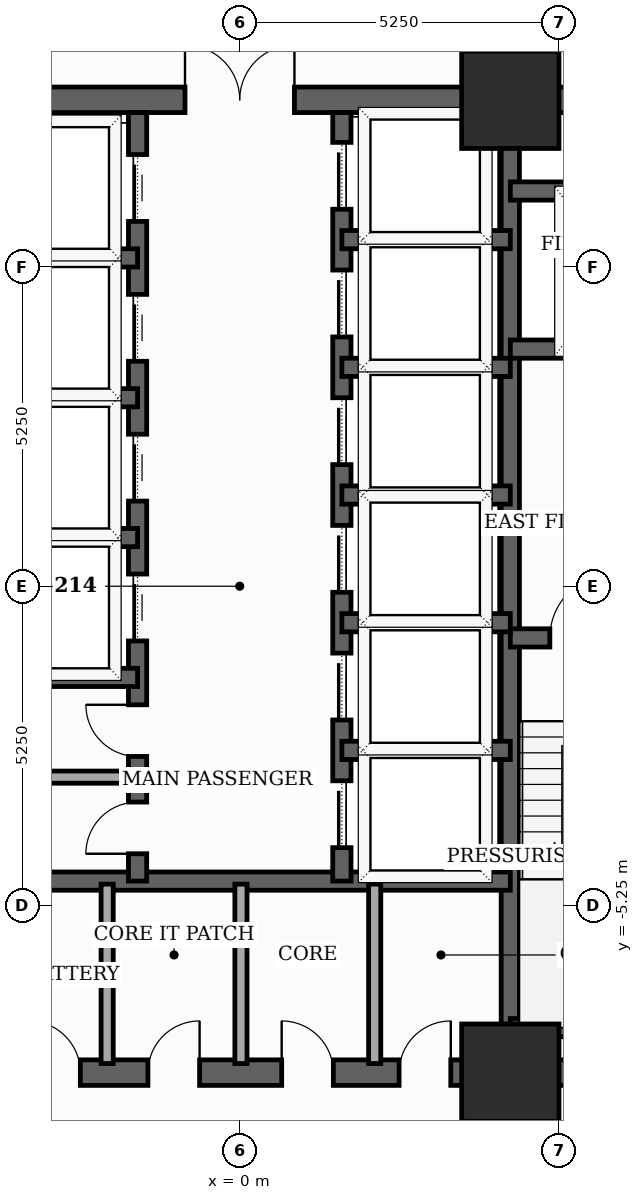
"""IFC4 building model, lengths in metres.
Left out: names, types, materials, properties, quantities, classifications, styles, units other than length and angle.
Written with IfcOpenShell. Run it as: python <this file> out.ifc"""

import sys

from ifc_helpers import new_model, si_unit, direction, frame, frame_2d, origin, origin_2d, place, context, subcontext, project, spatial, rectangle, extrude, element, fill, save


model = new_model("IFC4")
c1 = context("Model", 3, precision=1e-05, world=origin(), true_north=direction((0.0, 1.0)))
c2 = subcontext(c1, "Body", "Model", "MODEL_VIEW")
j1 = project(units=[si_unit("LENGTHUNIT", "METRE"), si_unit("PLANEANGLEUNIT", "RADIAN")], contexts=[c1])
p1 = place(None, origin())
s1 = spatial("IfcSite", under=j1, at=p1, CompositionType="ELEMENT")
p2 = place(p1, origin())
s2 = spatial("IfcBuilding", under=s1, at=p2, CompositionType="ELEMENT")
p3 = place(p2, frame((0.0, 0.0, 81.5)))
s3 = spatial("IfcBuildingStorey", under=s2, at=p3, CompositionType="ELEMENT", Elevation=81.5)
for number, where, z_axis, x_axis in (
    (1, (4.45, -8.0, 0.0), (0.0, 0.0, 1.0), (1.0, 0.0, 0.0)),
    (2, (4.45, 8.0, 0.0), (0.0, 0.0, 1.0), (1.0, 0.0, 0.0)),
):
    element("IfcColumn", number, at=place(p3, frame(where, z_axis=z_axis, x_axis=x_axis)), inside=s3, PredefinedType="COLUMN", context=c2, shape_type="SweptSolid", body=[
        extrude(rectangle(XDim=1.6, YDim=1.6, at=origin_2d()), origin(), (0.0, 0.0, 1.0), 3.7),
    ])
p4 = place(p3, frame((-8.0, -8.0, 0.0), z_axis=(0.0, 0.0, 1.0), x_axis=(1.0, 0.0, 0.0)))
e3 = element("IfcWall", 3, at=p4, inside=s3, PredefinedType="SHEAR", context=c2, shape_type="SweptSolid", body=[
    extrude(rectangle(XDim=16.0, YDim=0.42, at=frame_2d((8.0, 0.0))), origin(), (0.0, 0.0, 1.0), 3.46),
])
p5 = place(p4, frame((4.529, 0.0, 0.0)))
e4 = element("IfcOpeningElement", 4, at=p5, cuts=e3, PredefinedType="OPENING", context=c2, shape_type="SweptSolid", body=[
    extrude(rectangle(XDim=0.85, YDim=2.02, at=frame_2d((0.425, 1.01))), frame((0.0, 0.22, 0.0), z_axis=(0.0, -1.0, 0.0), x_axis=(1.0, 0.0, 0.0)), (0.0, 0.0, 1.0), 0.44),
])
p6 = place(p4, frame((6.49, 0.0, 0.0)))
e5 = element("IfcOpeningElement", 5, at=p6, cuts=e3, PredefinedType="OPENING", context=c2, shape_type="SweptSolid", body=[
    extrude(rectangle(XDim=0.85, YDim=2.02, at=frame_2d((0.425, 1.01))), frame((0.0, 0.22, 0.0), z_axis=(0.0, -1.0, 0.0), x_axis=(1.0, 0.0, 0.0)), (0.0, 0.0, 1.0), 0.44),
])
p7 = place(p4, frame((8.69, 0.0, 0.0)))
e6 = element("IfcOpeningElement", 6, at=p7, cuts=e3, PredefinedType="OPENING", context=c2, shape_type="SweptSolid", body=[
    extrude(rectangle(XDim=0.85, YDim=2.02, at=frame_2d((0.425, 1.01))), frame((0.0, 0.22, 0.0), z_axis=(0.0, -1.0, 0.0), x_axis=(1.0, 0.0, 0.0)), (0.0, 0.0, 1.0), 0.44),
])
p8 = place(p4, frame((10.621, 0.0, 0.0)))
e7 = element("IfcOpeningElement", 7, at=p8, cuts=e3, PredefinedType="OPENING", context=c2, shape_type="SweptSolid", body=[
    extrude(rectangle(XDim=0.85, YDim=2.02, at=frame_2d((0.425, 1.01))), frame((0.0, 0.22, 0.0), z_axis=(0.0, -1.0, 0.0), x_axis=(1.0, 0.0, 0.0)), (0.0, 0.0, 1.0), 0.44),
])
p9 = place(p3, frame((-8.0, 8.0, 0.0), z_axis=(0.0, 0.0, 1.0), x_axis=(1.0, 0.0, 0.0)))
e8 = element("IfcWall", 8, at=p9, inside=s3, PredefinedType="SHEAR", context=c2, shape_type="SweptSolid", body=[
    extrude(rectangle(XDim=16.0, YDim=0.42, at=frame_2d((8.0, 0.0))), origin(), (0.0, 0.0, 1.0), 3.46),
])
p10 = place(p9, frame((7.1, 0.0, 0.0)))
e9 = element("IfcOpeningElement", 9, at=p10, cuts=e8, PredefinedType="OPENING", context=c2, shape_type="SweptSolid", body=[
    extrude(rectangle(XDim=1.8, YDim=2.15, at=frame_2d((0.9, 1.075))), frame((0.0, 0.22, 0.0), z_axis=(0.0, -1.0, 0.0), x_axis=(1.0, 0.0, 0.0)), (0.0, 0.0, 1.0), 0.44),
])
p11 = place(p3, frame((4.45, -7.79, 0.0), z_axis=(0.0, 0.0, 1.0), x_axis=(0.0, 1.0, 0.0)))
e10 = element("IfcWall", 10, at=p11, inside=s3, PredefinedType="SHEAR", context=c2, shape_type="SweptSolid", body=[
    extrude(rectangle(XDim=15.58, YDim=0.3, at=frame_2d((7.79, 0.0))), origin(), (0.0, 0.0, 1.0), 3.46),
])
p12 = place(p3, frame((4.45, -0.85, 0.0), z_axis=(0.0, 0.0, 1.0), x_axis=(1.0, 0.0, 0.0)))
e11 = element("IfcWall", 11, at=p12, inside=s3, PredefinedType="SHEAR", context=c2, shape_type="SweptSolid", body=[
    extrude(rectangle(XDim=3.34, YDim=0.3, at=frame_2d((1.67, 0.0))), origin(), (0.0, 0.0, 1.0), 3.46),
])
p13 = place(p12, frame((0.65, 0.0, 0.0)))
e12 = element("IfcOpeningElement", 12, at=p13, cuts=e11, PredefinedType="OPENING", context=c2, shape_type="SweptSolid", body=[
    extrude(rectangle(XDim=1.05, YDim=2.15, at=frame_2d((0.525, 1.075))), frame((0.0, 0.16, 0.0), z_axis=(0.0, -1.0, 0.0), x_axis=(1.0, 0.0, 0.0)), (0.0, 0.0, 1.0), 0.32),
])
p14 = place(p3, frame((4.45, -7.26, 0.0), z_axis=(0.0, 0.0, 1.0), x_axis=(1.0, 0.0, 0.0)))
e13 = element("IfcWall", 13, at=p14, inside=s3, PredefinedType="SHEAR", context=c2, shape_type="SweptSolid", body=[
    extrude(rectangle(XDim=3.55, YDim=0.3, at=frame_2d((1.775, 0.0))), origin(), (0.0, 0.0, 1.0), 3.46),
])
p15 = place(p3, frame((4.45, 3.9, 0.0), z_axis=(0.0, 0.0, 1.0), x_axis=(1.0, 0.0, 0.0)))
e14 = element("IfcWall", 14, at=p15, inside=s3, PredefinedType="SHEAR", context=c2, shape_type="SweptSolid", body=[
    extrude(rectangle(XDim=3.34, YDim=0.3, at=frame_2d((1.67, 0.0))), origin(), (0.0, 0.0, 1.0), 3.46),
])
p16 = place(p15, frame((1.18, 0.0, 0.0)))
e15 = element("IfcOpeningElement", 15, at=p16, cuts=e14, PredefinedType="OPENING", context=c2, shape_type="SweptSolid", body=[
    extrude(rectangle(XDim=1.1, YDim=2.1, at=frame_2d((0.55, 1.05))), frame((0.0, 0.16, 0.0), z_axis=(0.0, -1.0, 0.0), x_axis=(1.0, 0.0, 0.0)), (0.0, 0.0, 1.0), 0.32),
])
p17 = place(p3, frame((4.45, 6.5, 0.0), z_axis=(0.0, 0.0, 1.0), x_axis=(1.0, 0.0, 0.0)))
e16 = element("IfcWall", 16, at=p17, inside=s3, PredefinedType="SHEAR", context=c2, shape_type="SweptSolid", body=[
    extrude(rectangle(XDim=3.34, YDim=0.3, at=frame_2d((1.67, 0.0))), origin(), (0.0, 0.0, 1.0), 3.46),
])
p18 = place(p3, frame((-4.45, -4.85, 0.0), z_axis=(0.0, 0.0, 1.0), x_axis=(1.0, 0.0, 0.0)))
e17 = element("IfcWall", 17, at=p18, inside=s3, PredefinedType="SHEAR", context=c2, shape_type="SweptSolid", body=[
    extrude(rectangle(XDim=8.9, YDim=0.3, at=frame_2d((4.45, 0.0))), origin(), (0.0, 0.0, 1.0), 3.46),
])
p19 = place(p3, frame((-1.68, -4.85, 0.0), z_axis=(0.0, 0.0, 1.0), x_axis=(0.0, 1.0, 0.0)))
e18 = element("IfcWall", 18, at=p19, inside=s3, PredefinedType="SHEAR", context=c2, shape_type="SweptSolid", body=[
    extrude(rectangle(XDim=12.64, YDim=0.3, at=frame_2d((6.32, 0.0))), origin(), (0.0, 0.0, 1.0), 3.46),
])
p20 = place(p19, frame((3.95, 0.0, 0.0)))
e19 = element("IfcOpeningElement", 19, at=p20, cuts=e18, PredefinedType="OPENING", context=c2, shape_type="SweptSolid", body=[
    extrude(rectangle(XDim=1.1, YDim=2.1, at=frame_2d((0.55, 1.05))), frame((0.0, 0.16, 0.0), z_axis=(0.0, -1.0, 0.0), x_axis=(1.0, 0.0, 0.0)), (0.0, 0.0, 1.0), 0.32),
])
p21 = place(p19, frame((6.25, 0.0, 0.0)))
e20 = element("IfcOpeningElement", 20, at=p21, cuts=e18, PredefinedType="OPENING", context=c2, shape_type="SweptSolid", body=[
    extrude(rectangle(XDim=1.1, YDim=2.1, at=frame_2d((0.55, 1.05))), frame((0.0, 0.16, 0.0), z_axis=(0.0, -1.0, 0.0), x_axis=(1.0, 0.0, 0.0)), (0.0, 0.0, 1.0), 0.32),
])
p22 = place(p19, frame((8.55, 0.0, 0.0)))
e21 = element("IfcOpeningElement", 21, at=p22, cuts=e18, PredefinedType="OPENING", context=c2, shape_type="SweptSolid", body=[
    extrude(rectangle(XDim=1.1, YDim=2.1, at=frame_2d((0.55, 1.05))), frame((0.0, 0.16, 0.0), z_axis=(0.0, -1.0, 0.0), x_axis=(1.0, 0.0, 0.0)), (0.0, 0.0, 1.0), 0.32),
])
p23 = place(p19, frame((10.85, 0.0, 0.0)))
e22 = element("IfcOpeningElement", 22, at=p23, cuts=e18, PredefinedType="OPENING", context=c2, shape_type="SweptSolid", body=[
    extrude(rectangle(XDim=1.1, YDim=2.1, at=frame_2d((0.55, 1.05))), frame((0.0, 0.16, 0.0), z_axis=(0.0, -1.0, 0.0), x_axis=(1.0, 0.0, 0.0)), (0.0, 0.0, 1.0), 0.32),
])
p24 = place(p19, frame((0.45, 0.0, 0.0)))
e23 = element("IfcOpeningElement", 23, at=p24, cuts=e18, PredefinedType="OPENING", context=c2, shape_type="SweptSolid", body=[
    extrude(rectangle(XDim=0.85, YDim=2.02, at=frame_2d((0.425, 1.01))), frame((0.0, 0.16, 0.0), z_axis=(0.0, -1.0, 0.0), x_axis=(1.0, 0.0, 0.0)), (0.0, 0.0, 1.0), 0.32),
])
p25 = place(p19, frame((2.05, 0.0, 0.0)))
e24 = element("IfcOpeningElement", 24, at=p25, cuts=e18, PredefinedType="OPENING", context=c2, shape_type="SweptSolid", body=[
    extrude(rectangle(XDim=0.85, YDim=2.02, at=frame_2d((0.425, 1.01))), frame((0.0, 0.16, 0.0), z_axis=(0.0, -1.0, 0.0), x_axis=(1.0, 0.0, 0.0)), (0.0, 0.0, 1.0), 0.32),
])
p26 = place(p3, frame((1.68, -4.85, 0.0), z_axis=(0.0, 0.0, 1.0), x_axis=(0.0, 1.0, 0.0)))
e25 = element("IfcWall", 25, at=p26, inside=s3, PredefinedType="SHEAR", context=c2, shape_type="SweptSolid", body=[
    extrude(rectangle(XDim=12.64, YDim=0.3, at=frame_2d((6.32, 0.0))), origin(), (0.0, 0.0, 1.0), 3.46),
])
p27 = place(p26, frame((0.55, 0.0, 0.0)))
e26 = element("IfcOpeningElement", 26, at=p27, cuts=e25, PredefinedType="OPENING", context=c2, shape_type="SweptSolid", body=[
    extrude(rectangle(XDim=1.1, YDim=2.1, at=frame_2d((0.55, 1.05))), frame((0.0, 0.16, 0.0), z_axis=(0.0, -1.0, 0.0), x_axis=(1.0, 0.0, 0.0)), (0.0, 0.0, 1.0), 0.32),
])
p28 = place(p26, frame((2.65, 0.0, 0.0)))
e27 = element("IfcOpeningElement", 27, at=p28, cuts=e25, PredefinedType="OPENING", context=c2, shape_type="SweptSolid", body=[
    extrude(rectangle(XDim=1.1, YDim=2.1, at=frame_2d((0.55, 1.05))), frame((0.0, 0.16, 0.0), z_axis=(0.0, -1.0, 0.0), x_axis=(1.0, 0.0, 0.0)), (0.0, 0.0, 1.0), 0.32),
])
p29 = place(p26, frame((4.75, 0.0, 0.0)))
e28 = element("IfcOpeningElement", 28, at=p29, cuts=e25, PredefinedType="OPENING", context=c2, shape_type="SweptSolid", body=[
    extrude(rectangle(XDim=1.1, YDim=2.1, at=frame_2d((0.55, 1.05))), frame((0.0, 0.16, 0.0), z_axis=(0.0, -1.0, 0.0), x_axis=(1.0, 0.0, 0.0)), (0.0, 0.0, 1.0), 0.32),
])
p30 = place(p26, frame((6.85, 0.0, 0.0)))
e29 = element("IfcOpeningElement", 29, at=p30, cuts=e25, PredefinedType="OPENING", context=c2, shape_type="SweptSolid", body=[
    extrude(rectangle(XDim=1.1, YDim=2.1, at=frame_2d((0.55, 1.05))), frame((0.0, 0.16, 0.0), z_axis=(0.0, -1.0, 0.0), x_axis=(1.0, 0.0, 0.0)), (0.0, 0.0, 1.0), 0.32),
])
p31 = place(p26, frame((8.95, 0.0, 0.0)))
e30 = element("IfcOpeningElement", 30, at=p31, cuts=e25, PredefinedType="OPENING", context=c2, shape_type="SweptSolid", body=[
    extrude(rectangle(XDim=1.1, YDim=2.1, at=frame_2d((0.55, 1.05))), frame((0.0, 0.16, 0.0), z_axis=(0.0, -1.0, 0.0), x_axis=(1.0, 0.0, 0.0)), (0.0, 0.0, 1.0), 0.32),
])
p32 = place(p26, frame((11.05, 0.0, 0.0)))
e31 = element("IfcOpeningElement", 31, at=p32, cuts=e25, PredefinedType="OPENING", context=c2, shape_type="SweptSolid", body=[
    extrude(rectangle(XDim=1.1, YDim=2.1, at=frame_2d((0.55, 1.05))), frame((0.0, 0.16, 0.0), z_axis=(0.0, -1.0, 0.0), x_axis=(1.0, 0.0, 0.0)), (0.0, 0.0, 1.0), 0.32),
])
for number, where, z_axis, x_axis in (
    (32, (-4.45, -1.5, 0.0), (0.0, 0.0, 1.0), (1.0, 0.0, 0.0)),
    (33, (-4.45, 0.8, 0.0), (0.0, 0.0, 1.0), (1.0, 0.0, 0.0)),
    (34, (-4.45, 3.1, 0.0), (0.0, 0.0, 1.0), (1.0, 0.0, 0.0)),
    (35, (-4.45, 5.4, 0.0), (0.0, 0.0, 1.0), (1.0, 0.0, 0.0)),
    (36, (1.68, 1.5, 0.0), (0.0, 0.0, 1.0), (1.0, 0.0, 0.0)),
    (37, (1.68, 3.6, 0.0), (0.0, 0.0, 1.0), (1.0, 0.0, 0.0)),
    (38, (1.68, 5.7, 0.0), (0.0, 0.0, 1.0), (1.0, 0.0, 0.0)),
    (39, (1.68, -2.7, 0.0), (0.0, 0.0, 1.0), (1.0, 0.0, 0.0)),
    (40, (1.68, -0.6, 0.0), (0.0, 0.0, 1.0), (1.0, 0.0, 0.0)),
):
    element("IfcWall", number, at=place(p3, frame(where, z_axis=z_axis, x_axis=x_axis)), inside=s3, PredefinedType="SHEAR", context=c2, shape_type="SweptSolid", body=[
        extrude(rectangle(XDim=2.77, YDim=0.3, at=frame_2d((1.385, 0.0))), origin(), (0.0, 0.0, 1.0), 3.46),
    ])
for number, where, z_axis, x_axis in (
    (41, (-2.18, -7.85, 0.0), (0.0, 0.0, 1.0), (0.0, 1.0, 0.0)),
    (42, (0.02, -7.85, 0.0), (0.0, 0.0, 1.0), (0.0, 1.0, 0.0)),
    (43, (2.22, -7.85, 0.0), (0.0, 0.0, 1.0), (0.0, 1.0, 0.0)),
):
    element("IfcWall", number, at=place(p3, frame(where, z_axis=z_axis, x_axis=x_axis)), inside=s3, PredefinedType="SOLIDWALL", context=c2, shape_type="SweptSolid", body=[
        extrude(rectangle(XDim=2.95, YDim=0.2, at=frame_2d((1.475, 0.0))), origin(), (0.0, 0.0, 1.0), 2.845),
    ])
p33 = place(p3, frame((-4.4, -3.14, 0.0), z_axis=(0.0, 0.0, 1.0), x_axis=(1.0, 0.0, 0.0)))
e44 = element("IfcWall", 44, at=p33, inside=s3, PredefinedType="SOLIDWALL", context=c2, shape_type="SweptSolid", body=[
    extrude(rectangle(XDim=2.68, YDim=0.2, at=frame_2d((1.34, 0.0))), origin(), (0.0, 0.0, 1.0), 3.46),
])
p34 = place(p5, origin())
e45 = element("IfcDoor", 45, at=p34, inside=s3, OperationType="SINGLE_SWING_LEFT", PredefinedType="TRAPDOOR", context=c2, shape_type="SweptSolid", body=[
    extrude(rectangle(XDim=0.85, YDim=2.02, at=frame_2d((0.425, 1.01))), frame((0.0, 0.025, 0.0), z_axis=(0.0, -1.0, 0.0), x_axis=(1.0, 0.0, 0.0)), (0.0, 0.0, 1.0), 0.05),
])
fill(e4, e45)
p35 = place(p6, origin())
e46 = element("IfcDoor", 46, at=p35, inside=s3, OperationType="SINGLE_SWING_RIGHT", PredefinedType="TRAPDOOR", context=c2, shape_type="SweptSolid", body=[
    extrude(rectangle(XDim=0.85, YDim=2.02, at=frame_2d((0.425, 1.01))), frame((0.0, 0.025, 0.0), z_axis=(0.0, -1.0, 0.0), x_axis=(1.0, 0.0, 0.0)), (0.0, 0.0, 1.0), 0.05),
])
fill(e5, e46)
p36 = place(p7, origin())
e47 = element("IfcDoor", 47, at=p36, inside=s3, OperationType="SINGLE_SWING_LEFT", PredefinedType="TRAPDOOR", context=c2, shape_type="SweptSolid", body=[
    extrude(rectangle(XDim=0.85, YDim=2.02, at=frame_2d((0.425, 1.01))), frame((0.0, 0.025, 0.0), z_axis=(0.0, -1.0, 0.0), x_axis=(1.0, 0.0, 0.0)), (0.0, 0.0, 1.0), 0.05),
])
fill(e6, e47)
p37 = place(p8, origin())
e48 = element("IfcDoor", 48, at=p37, inside=s3, OperationType="SINGLE_SWING_RIGHT", PredefinedType="TRAPDOOR", context=c2, shape_type="SweptSolid", body=[
    extrude(rectangle(XDim=0.85, YDim=2.02, at=frame_2d((0.425, 1.01))), frame((0.0, 0.025, 0.0), z_axis=(0.0, -1.0, 0.0), x_axis=(1.0, 0.0, 0.0)), (0.0, 0.0, 1.0), 0.05),
])
fill(e7, e48)
p38 = place(p10, origin())
e49 = element("IfcDoor", 49, at=p38, inside=s3, OperationType="DOUBLE_DOOR_SINGLE_SWING", PredefinedType="DOOR", context=c2, shape_type="SweptSolid", body=[
    extrude(rectangle(XDim=1.8, YDim=2.15, at=frame_2d((0.9, 1.075))), frame((0.0, 0.025, 0.0), z_axis=(0.0, -1.0, 0.0), x_axis=(1.0, 0.0, 0.0)), (0.0, 0.0, 1.0), 0.05),
])
fill(e9, e49)
p39 = place(p13, origin())
e50 = element("IfcDoor", 50, at=p39, inside=s3, OperationType="SINGLE_SWING_RIGHT", PredefinedType="DOOR", context=c2, shape_type="SweptSolid", body=[
    extrude(rectangle(XDim=1.05, YDim=2.15, at=frame_2d((0.525, 1.075))), frame((0.0, 0.025, 0.0), z_axis=(0.0, -1.0, 0.0), x_axis=(1.0, 0.0, 0.0)), (0.0, 0.0, 1.0), 0.05),
])
fill(e12, e50)
p40 = place(p20, origin())
e51 = element("IfcDoor", 51, at=p40, inside=s3, OperationType="SLIDING_TO_LEFT", PredefinedType="DOOR", context=c2, shape_type="SweptSolid", body=[
    extrude(rectangle(XDim=1.1, YDim=2.1, at=frame_2d((0.55, 1.05))), frame((0.0, 0.025, 0.0), z_axis=(0.0, -1.0, 0.0), x_axis=(1.0, 0.0, 0.0)), (0.0, 0.0, 1.0), 0.05),
])
fill(e19, e51)
p41 = place(p21, origin())
e52 = element("IfcDoor", 52, at=p41, inside=s3, OperationType="SLIDING_TO_LEFT", PredefinedType="DOOR", context=c2, shape_type="SweptSolid", body=[
    extrude(rectangle(XDim=1.1, YDim=2.1, at=frame_2d((0.55, 1.05))), frame((0.0, 0.025, 0.0), z_axis=(0.0, -1.0, 0.0), x_axis=(1.0, 0.0, 0.0)), (0.0, 0.0, 1.0), 0.05),
])
fill(e20, e52)
p42 = place(p22, origin())
e53 = element("IfcDoor", 53, at=p42, inside=s3, OperationType="SLIDING_TO_LEFT", PredefinedType="DOOR", context=c2, shape_type="SweptSolid", body=[
    extrude(rectangle(XDim=1.1, YDim=2.1, at=frame_2d((0.55, 1.05))), frame((0.0, 0.025, 0.0), z_axis=(0.0, -1.0, 0.0), x_axis=(1.0, 0.0, 0.0)), (0.0, 0.0, 1.0), 0.05),
])
fill(e21, e53)
p43 = place(p23, origin())
e54 = element("IfcDoor", 54, at=p43, inside=s3, OperationType="SLIDING_TO_LEFT", PredefinedType="DOOR", context=c2, shape_type="SweptSolid", body=[
    extrude(rectangle(XDim=1.1, YDim=2.1, at=frame_2d((0.55, 1.05))), frame((0.0, 0.025, 0.0), z_axis=(0.0, -1.0, 0.0), x_axis=(1.0, 0.0, 0.0)), (0.0, 0.0, 1.0), 0.05),
])
fill(e22, e54)
p44 = place(p24, origin())
e55 = element("IfcDoor", 55, at=p44, inside=s3, OperationType="SINGLE_SWING_LEFT", PredefinedType="TRAPDOOR", context=c2, shape_type="SweptSolid", body=[
    extrude(rectangle(XDim=0.85, YDim=2.02, at=frame_2d((0.425, 1.01))), frame((0.0, 0.025, 0.0), z_axis=(0.0, -1.0, 0.0), x_axis=(1.0, 0.0, 0.0)), (0.0, 0.0, 1.0), 0.05),
])
fill(e23, e55)
p45 = place(p25, origin())
e56 = element("IfcDoor", 56, at=p45, inside=s3, OperationType="SINGLE_SWING_RIGHT", PredefinedType="TRAPDOOR", context=c2, shape_type="SweptSolid", body=[
    extrude(rectangle(XDim=0.85, YDim=2.02, at=frame_2d((0.425, 1.01))), frame((0.0, 0.025, 0.0), z_axis=(0.0, -1.0, 0.0), x_axis=(1.0, 0.0, 0.0)), (0.0, 0.0, 1.0), 0.05),
])
fill(e24, e56)
p46 = place(p27, origin())
e57 = element("IfcDoor", 57, at=p46, inside=s3, OperationType="SLIDING_TO_LEFT", PredefinedType="DOOR", context=c2, shape_type="SweptSolid", body=[
    extrude(rectangle(XDim=1.1, YDim=2.1, at=frame_2d((0.55, 1.05))), frame((0.0, 0.025, 0.0), z_axis=(0.0, -1.0, 0.0), x_axis=(1.0, 0.0, 0.0)), (0.0, 0.0, 1.0), 0.05),
])
fill(e26, e57)
p47 = place(p28, origin())
e58 = element("IfcDoor", 58, at=p47, inside=s3, OperationType="SLIDING_TO_LEFT", PredefinedType="DOOR", context=c2, shape_type="SweptSolid", body=[
    extrude(rectangle(XDim=1.1, YDim=2.1, at=frame_2d((0.55, 1.05))), frame((0.0, 0.025, 0.0), z_axis=(0.0, -1.0, 0.0), x_axis=(1.0, 0.0, 0.0)), (0.0, 0.0, 1.0), 0.05),
])
fill(e27, e58)
p48 = place(p29, origin())
e59 = element("IfcDoor", 59, at=p48, inside=s3, OperationType="SLIDING_TO_LEFT", PredefinedType="DOOR", context=c2, shape_type="SweptSolid", body=[
    extrude(rectangle(XDim=1.1, YDim=2.1, at=frame_2d((0.55, 1.05))), frame((0.0, 0.025, 0.0), z_axis=(0.0, -1.0, 0.0), x_axis=(1.0, 0.0, 0.0)), (0.0, 0.0, 1.0), 0.05),
])
fill(e28, e59)
p49 = place(p30, origin())
e60 = element("IfcDoor", 60, at=p49, inside=s3, OperationType="SLIDING_TO_LEFT", PredefinedType="DOOR", context=c2, shape_type="SweptSolid", body=[
    extrude(rectangle(XDim=1.1, YDim=2.1, at=frame_2d((0.55, 1.05))), frame((0.0, 0.025, 0.0), z_axis=(0.0, -1.0, 0.0), x_axis=(1.0, 0.0, 0.0)), (0.0, 0.0, 1.0), 0.05),
])
fill(e29, e60)
p50 = place(p31, origin())
e61 = element("IfcDoor", 61, at=p50, inside=s3, OperationType="SLIDING_TO_LEFT", PredefinedType="DOOR", context=c2, shape_type="SweptSolid", body=[
    extrude(rectangle(XDim=1.1, YDim=2.1, at=frame_2d((0.55, 1.05))), frame((0.0, 0.025, 0.0), z_axis=(0.0, -1.0, 0.0), x_axis=(1.0, 0.0, 0.0)), (0.0, 0.0, 1.0), 0.05),
])
fill(e30, e61)
p51 = place(p32, origin())
e62 = element("IfcDoor", 62, at=p51, inside=s3, OperationType="SLIDING_TO_LEFT", PredefinedType="DOOR", context=c2, shape_type="SweptSolid", body=[
    extrude(rectangle(XDim=1.1, YDim=2.1, at=frame_2d((0.55, 1.05))), frame((0.0, 0.025, 0.0), z_axis=(0.0, -1.0, 0.0), x_axis=(1.0, 0.0, 0.0)), (0.0, 0.0, 1.0), 0.05),
])
fill(e31, e62)
save(model, sys.argv[1])
